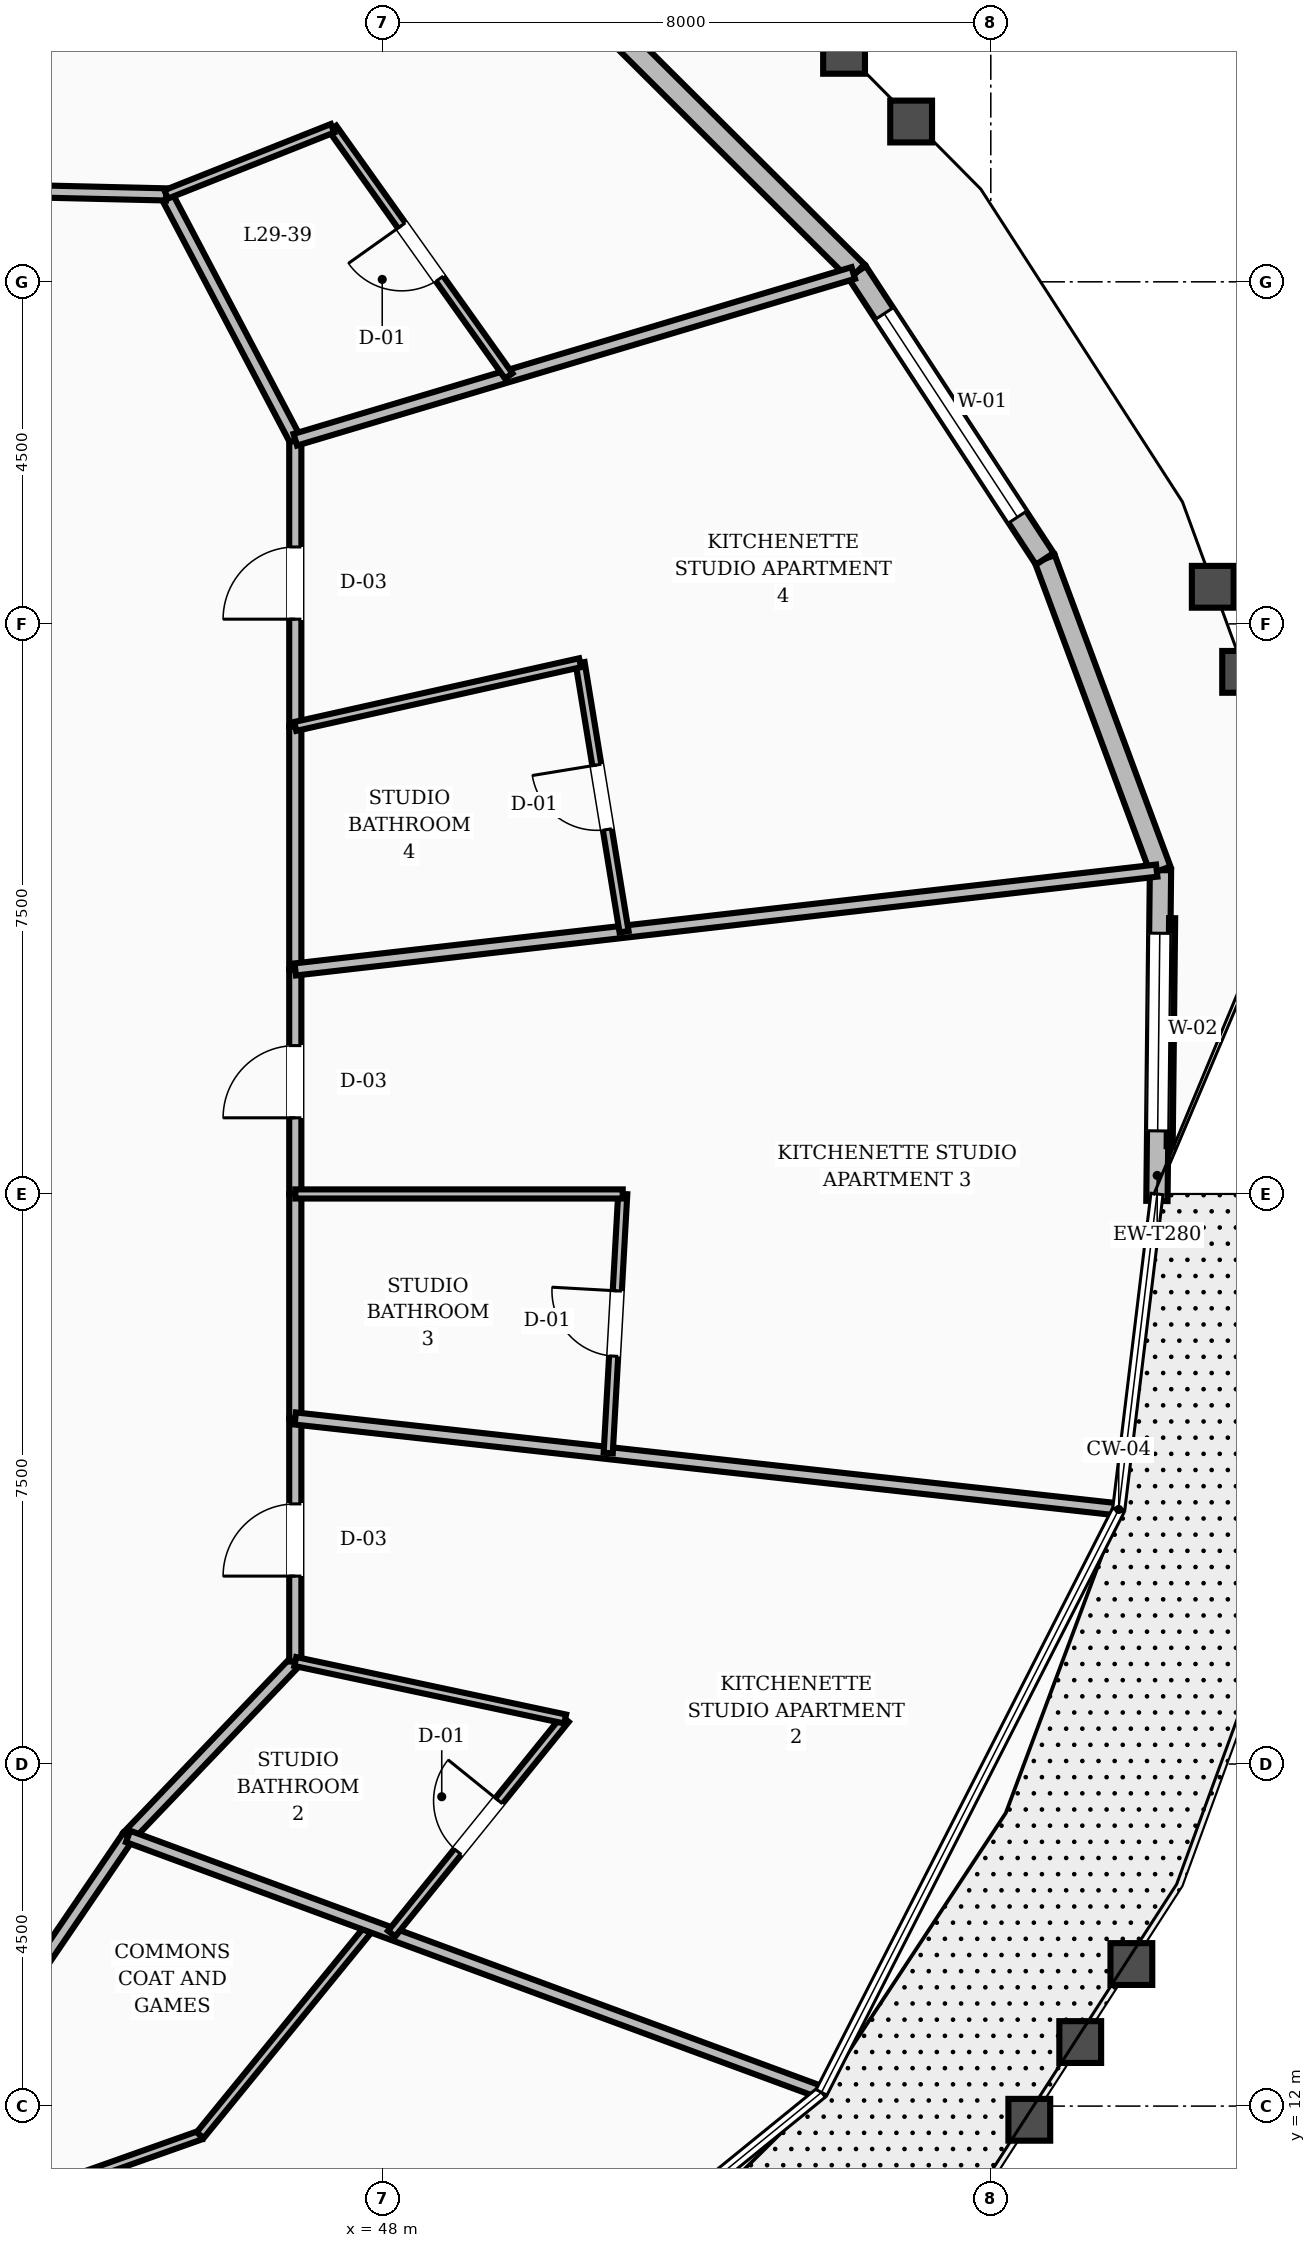
"""IFC4 building model, lengths in metres.
Left out: names, types, materials, properties, quantities, classifications, styles, units other than length and angle.
Written with IfcOpenShell. Run it as: python <this file> out.ifc"""

import sys

from ifc_helpers import new_model, si_unit, direction, frame, frame_2d, origin, place, context, subcontext, project, spatial, rectangle, extrude, element, fill, save


model = new_model("IFC4")
c1 = context("Model", 3, precision=1e-05, world=origin(), true_north=direction((0.0, 1.0)))
c2 = subcontext(c1, "Body", "Model", "MODEL_VIEW")
j1 = project(units=[si_unit("LENGTHUNIT", "METRE"), si_unit("PLANEANGLEUNIT", "RADIAN")], contexts=[c1])
p1 = place(None, origin())
s1 = spatial("IfcSite", under=j1, at=p1, CompositionType="ELEMENT")
p2 = place(p1, origin())
s2 = spatial("IfcBuilding", under=s1, at=p2, CompositionType="ELEMENT")
p3 = place(p2, frame((0.0, 0.0, 117.2)))
s3 = spatial("IfcBuildingStorey", under=s2, at=p3, CompositionType="ELEMENT", Elevation=117.2)
p4 = place(p3, frame((58.186, 23.908, 0.0), z_axis=(0.0, 0.0, 1.0), x_axis=(0.010826854859, 0.999941387889, 0.0)))
e1 = element("IfcWall", 1, at=p4, inside=s3, PredefinedType="STANDARD", context=c2, shape_type="SweptSolid", body=[
    extrude(rectangle(XDim=4.352, YDim=0.28, at=frame_2d((2.176, 0.0))), origin(), (0.0, 0.0, 1.0), 2.82),
])
p5 = place(p4, frame((0.922, 0.0, 0.8)))
e2 = element("IfcOpeningElement", 2, at=p5, cuts=e1, PredefinedType="OPENING", context=c2, shape_type="SweptSolid", body=[
    extrude(rectangle(XDim=2.6, YDim=1.65, at=frame_2d((1.3, 0.825))), frame((0.0, 0.15, 0.0), z_axis=(0.0, -1.0, 0.0), x_axis=(1.0, 0.0, 0.0)), (0.0, 0.0, 1.0), 0.3),
])
p6 = place(p3, frame((58.233, 28.26, 0.0), z_axis=(0.0, 0.0, 1.0), x_axis=(-0.34836047158, 0.937360646625, 0.0)))
e3 = element("IfcWall", 3, at=p6, inside=s3, PredefinedType="STANDARD", context=c2, shape_type="SweptSolid", body=[
    extrude(rectangle(XDim=4.37, YDim=0.28, at=frame_2d((2.185, 0.0))), origin(), (0.0, 0.0, 1.0), 2.82),
])
p7 = place(p3, frame((56.71, 32.356, 0.0), z_axis=(0.0, 0.0, 1.0), x_axis=(-0.547750773174, 0.836641554363, 0.0)))
e4 = element("IfcWall", 4, at=p7, inside=s3, PredefinedType="STANDARD", context=c2, shape_type="SweptSolid", body=[
    extrude(rectangle(XDim=4.512, YDim=0.28, at=frame_2d((2.256, 0.0))), origin(), (0.0, 0.0, 1.0), 2.82),
])
p8 = place(p7, frame((0.656, 0.0, 0.8)))
e5 = element("IfcOpeningElement", 5, at=p8, cuts=e4, PredefinedType="OPENING", context=c2, shape_type="SweptSolid", body=[
    extrude(rectangle(XDim=3.2, YDim=1.65, at=frame_2d((1.6, 0.825))), frame((0.0, 0.15, 0.0), z_axis=(0.0, -1.0, 0.0), x_axis=(1.0, 0.0, 0.0)), (0.0, 0.0, 1.0), 0.3),
])
p9 = place(p3, frame((54.239, 36.131, 0.0), z_axis=(0.0, 0.0, 1.0), x_axis=(-0.708977561681, 0.705231038052, 0.0)))
e6 = element("IfcWall", 6, at=p9, inside=s3, PredefinedType="STANDARD", context=c2, shape_type="SweptSolid", body=[
    extrude(rectangle(XDim=4.692, YDim=0.28, at=frame_2d((2.346, 0.0))), origin(), (0.0, 0.0, 1.0), 2.82),
])
p10 = place(p3, frame((46.85, 24.0, 0.0), z_axis=(0.0, 0.0, 1.0), x_axis=(0.0, 1.0, 0.0)))
e7 = element("IfcWall", 7, at=p10, inside=s3, PredefinedType="SOLIDWALL", context=c2, shape_type="SweptSolid", body=[
    extrude(rectangle(XDim=2.954, YDim=0.16, at=frame_2d((1.477, 0.0))), origin(), (0.0, 0.0, 1.0), 2.8),
])
p11 = place(p10, frame((1.002, 0.0, 0.0)))
e8 = element("IfcOpeningElement", 8, at=p11, cuts=e7, PredefinedType="OPENING", context=c2, shape_type="SweptSolid", body=[
    extrude(rectangle(XDim=0.95, YDim=2.1, at=frame_2d((0.475, 1.05))), frame((0.0, 0.09, 0.0), z_axis=(0.0, -1.0, 0.0), x_axis=(1.0, 0.0, 0.0)), (0.0, 0.0, 1.0), 0.18),
])
p12 = place(p3, frame((46.85, 26.954, 0.0), z_axis=(0.0, 0.0, 1.0), x_axis=(0.0, 1.0, 0.0)))
e9 = element("IfcWall", 9, at=p12, inside=s3, PredefinedType="SOLIDWALL", context=c2, shape_type="SweptSolid", body=[
    extrude(rectangle(XDim=3.197, YDim=0.16, at=frame_2d((1.599, 0.0))), origin(), (0.0, 0.0, 1.0), 2.8),
])
p13 = place(p3, frame((46.85, 30.151, 0.0), z_axis=(0.0, 0.0, 1.0), x_axis=(0.0, 1.0, 0.0)))
e10 = element("IfcWall", 10, at=p13, inside=s3, PredefinedType="SOLIDWALL", context=c2, shape_type="SweptSolid", body=[
    extrude(rectangle(XDim=3.771, YDim=0.16, at=frame_2d((1.886, 0.0))), origin(), (0.0, 0.0, 1.0), 2.8),
])
p14 = place(p13, frame((1.411, 0.0, 0.0)))
e11 = element("IfcOpeningElement", 11, at=p14, cuts=e10, PredefinedType="OPENING", context=c2, shape_type="SweptSolid", body=[
    extrude(rectangle(XDim=0.95, YDim=2.1, at=frame_2d((0.475, 1.05))), frame((0.0, 0.09, 0.0), z_axis=(0.0, -1.0, 0.0), x_axis=(1.0, 0.0, 0.0)), (0.0, 0.0, 1.0), 0.18),
])
p15 = place(p3, frame((46.85, 33.923, 0.0), z_axis=(0.0, 0.0, 1.0), x_axis=(-0.466093963429, 0.884735224378, 0.0)))
e12 = element("IfcWall", 12, at=p15, inside=s3, PredefinedType="SOLIDWALL", context=c2, shape_type="SweptSolid", body=[
    extrude(rectangle(XDim=3.648, YDim=0.16, at=frame_2d((1.824, 0.0))), origin(), (0.0, 0.0, 1.0), 2.8),
])
p16 = place(p3, frame((45.15, 37.15, 0.0), z_axis=(0.0, 0.0, 1.0), x_axis=(-0.999728709658, 0.023291781507, 0.0)))
e13 = element("IfcWall", 13, at=p16, inside=s3, PredefinedType="SOLIDWALL", context=c2, shape_type="SweptSolid", body=[
    extrude(rectangle(XDim=4.298, YDim=0.16, at=frame_2d((2.149, 0.0))), origin(), (0.0, 0.0, 1.0), 2.8),
])
p17 = place(p16, frame((1.674, 0.0, 0.0)))
e14 = element("IfcOpeningElement", 14, at=p17, cuts=e13, PredefinedType="OPENING", context=c2, shape_type="SweptSolid", body=[
    extrude(rectangle(XDim=0.95, YDim=2.1, at=frame_2d((0.475, 1.05))), frame((0.0, 0.09, 0.0), z_axis=(0.0, -1.0, 0.0), x_axis=(1.0, 0.0, 0.0)), (0.0, 0.0, 1.0), 0.18),
])
p18 = place(p3, frame((42.95, 13.05, 0.0), z_axis=(0.0, 0.0, 1.0), x_axis=(0.562674669208, 0.826678423955, 0.0)))
e15 = element("IfcWall", 15, at=p18, inside=s3, PredefinedType="SOLIDWALL", context=c2, shape_type="SweptSolid", body=[
    extrude(rectangle(XDim=3.021, YDim=0.16, at=frame_2d((1.511, 0.0))), origin(), (0.0, 0.0, 1.0), 2.8),
])
p19 = place(p3, frame((44.65, 15.548, 0.0), z_axis=(0.0, 0.0, 1.0), x_axis=(0.691055487108, 0.722801711216, 0.0)))
e16 = element("IfcWall", 16, at=p19, inside=s3, PredefinedType="SOLIDWALL", context=c2, shape_type="SweptSolid", body=[
    extrude(rectangle(XDim=3.184, YDim=0.16, at=frame_2d((1.592, 0.0))), origin(), (0.0, 0.0, 1.0), 2.8),
])
p20 = place(p3, frame((46.85, 17.849, 0.0), z_axis=(0.0, 0.0, 1.0), x_axis=(0.0, 1.0, 0.0)))
e17 = element("IfcWall", 17, at=p20, inside=s3, PredefinedType="SOLIDWALL", context=c2, shape_type="SweptSolid", body=[
    extrude(rectangle(XDim=3.197, YDim=0.16, at=frame_2d((1.599, 0.0))), origin(), (0.0, 0.0, 1.0), 2.8),
])
p21 = place(p20, frame((1.124, 0.0, 0.0)))
e18 = element("IfcOpeningElement", 18, at=p21, cuts=e17, PredefinedType="OPENING", context=c2, shape_type="SweptSolid", body=[
    extrude(rectangle(XDim=0.95, YDim=2.1, at=frame_2d((0.475, 1.05))), frame((0.0, 0.09, 0.0), z_axis=(0.0, -1.0, 0.0), x_axis=(1.0, 0.0, 0.0)), (0.0, 0.0, 1.0), 0.18),
])
p22 = place(p3, frame((46.85, 21.046, 0.0), z_axis=(0.0, 0.0, 1.0), x_axis=(0.0, 1.0, 0.0)))
e19 = element("IfcWall", 19, at=p22, inside=s3, PredefinedType="SOLIDWALL", context=c2, shape_type="SweptSolid", body=[
    extrude(rectangle(XDim=2.954, YDim=0.16, at=frame_2d((1.477, 0.0))), origin(), (0.0, 0.0, 1.0), 2.8),
])
p23 = place(p3, frame((42.065, 10.366, 0.0), z_axis=(0.0, 0.0, 1.0), x_axis=(0.942672477538, 0.333719343299, 0.0)))
e20 = element("IfcWall", 20, at=p23, inside=s3, PredefinedType="PARTITIONING", context=c2, shape_type="SweptSolid", body=[
    extrude(rectangle(XDim=3.749, YDim=0.12, at=frame_2d((1.874, 0.0))), origin(), (0.0, 0.0, 1.0), 2.8),
])
p24 = place(p3, frame((45.598, 11.617, 0.0), z_axis=(0.0, 0.0, 1.0), x_axis=(0.632136503623, 0.774857045388, 0.0)))
e21 = element("IfcWall", 21, at=p24, inside=s3, PredefinedType="PARTITIONING", context=c2, shape_type="SweptSolid", body=[
    extrude(rectangle(XDim=3.551, YDim=0.12, at=frame_2d((1.776, 0.0))), origin(), (0.0, 0.0, 1.0), 2.8),
])
p25 = place(p3, frame((44.65, 15.548, 0.0), z_axis=(0.0, 0.0, 1.0), x_axis=(0.938144779107, -0.34624322872, 0.0)))
e22 = element("IfcWall", 22, at=p25, inside=s3, PredefinedType="SOLIDWALL", context=c2, shape_type="SweptSolid", body=[
    extrude(rectangle(XDim=9.675, YDim=0.16, at=frame_2d((4.837, 0.0))), origin(), (0.0, 0.0, 1.0), 2.8),
])
p26 = place(p3, frame((48.117, 14.268, 0.0), z_axis=(0.0, 0.0, 1.0), x_axis=(0.628695338922, 0.777651702768, 0.0)))
e23 = element("IfcWall", 23, at=p26, inside=s3, PredefinedType="PARTITIONING", context=c2, shape_type="SweptSolid", body=[
    extrude(rectangle(XDim=3.632, YDim=0.12, at=frame_2d((1.816, 0.0))), origin(), (0.0, 0.0, 1.0), 2.8),
])
p27 = place(p26, frame((1.386, 0.0, 0.0)))
e24 = element("IfcOpeningElement", 24, at=p27, cuts=e23, PredefinedType="OPENING", context=c2, shape_type="SweptSolid", body=[
    extrude(rectangle(XDim=0.86, YDim=2.1, at=frame_2d((0.43, 1.05))), frame((0.0, 0.07, 0.0), z_axis=(0.0, -1.0, 0.0), x_axis=(1.0, 0.0, 0.0)), (0.0, 0.0, 1.0), 0.14),
])
p28 = place(p3, frame((46.85, 17.849, 0.0), z_axis=(0.0, 0.0, 1.0), x_axis=(0.978051717374, -0.208362276195, 0.0)))
e25 = element("IfcWall", 25, at=p28, inside=s3, PredefinedType="PARTITIONING", context=c2, shape_type="SweptSolid", body=[
    extrude(rectangle(XDim=3.63, YDim=0.12, at=frame_2d((1.815, 0.0))), origin(), (0.0, 0.0, 1.0), 2.8),
])
p29 = place(p3, frame((46.85, 21.046, 0.0), z_axis=(0.0, 0.0, 1.0), x_axis=(0.993954333891, -0.109794271889, 0.0)))
e26 = element("IfcWall", 26, at=p29, inside=s3, PredefinedType="SOLIDWALL", context=c2, shape_type="SweptSolid", body=[
    extrude(rectangle(XDim=10.849, YDim=0.16, at=frame_2d((5.425, 0.0))), origin(), (0.0, 0.0, 1.0), 2.8),
])
p30 = place(p3, frame((50.967, 20.592, 0.0), z_axis=(0.0, 0.0, 1.0), x_axis=(0.055996807688, 0.998430947802, 0.0)))
e27 = element("IfcWall", 27, at=p30, inside=s3, PredefinedType="PARTITIONING", context=c2, shape_type="SweptSolid", body=[
    extrude(rectangle(XDim=3.414, YDim=0.12, at=frame_2d((1.707, 0.0))), origin(), (0.0, 0.0, 1.0), 2.8),
])
p31 = place(p30, frame((1.277, 0.0, 0.0)))
e28 = element("IfcOpeningElement", 28, at=p31, cuts=e27, PredefinedType="OPENING", context=c2, shape_type="SweptSolid", body=[
    extrude(rectangle(XDim=0.86, YDim=2.1, at=frame_2d((0.43, 1.05))), frame((0.0, 0.07, 0.0), z_axis=(0.0, -1.0, 0.0), x_axis=(1.0, 0.0, 0.0)), (0.0, 0.0, 1.0), 0.14),
])
p32 = place(p3, frame((46.85, 24.0, 0.0), z_axis=(0.0, 0.0, 1.0), x_axis=(1.0, 0.0, 0.0)))
e29 = element("IfcWall", 29, at=p32, inside=s3, PredefinedType="PARTITIONING", context=c2, shape_type="SweptSolid", body=[
    extrude(rectangle(XDim=4.308, YDim=0.12, at=frame_2d((2.154, 0.0))), origin(), (0.0, 0.0, 1.0), 2.8),
])
p33 = place(p3, frame((46.85, 26.954, 0.0), z_axis=(0.0, 0.0, 1.0), x_axis=(0.993484362684, 0.113968509259, 0.0)))
e30 = element("IfcWall", 30, at=p33, inside=s3, PredefinedType="SOLIDWALL", context=c2, shape_type="SweptSolid", body=[
    extrude(rectangle(XDim=11.407, YDim=0.16, at=frame_2d((5.704, 0.0))), origin(), (0.0, 0.0, 1.0), 2.8),
])
p34 = place(p3, frame((51.175, 27.45, 0.0), z_axis=(0.0, 0.0, 1.0), x_axis=(-0.161295662085, 0.98690612998, 0.0)))
e31 = element("IfcWall", 31, at=p34, inside=s3, PredefinedType="PARTITIONING", context=c2, shape_type="SweptSolid", body=[
    extrude(rectangle(XDim=3.586, YDim=0.12, at=frame_2d((1.793, 0.0))), origin(), (0.0, 0.0, 1.0), 2.8),
])
p35 = place(p34, frame((1.363, 0.0, 0.0)))
e32 = element("IfcOpeningElement", 32, at=p35, cuts=e31, PredefinedType="OPENING", context=c2, shape_type="SweptSolid", body=[
    extrude(rectangle(XDim=0.86, YDim=2.1, at=frame_2d((0.43, 1.05))), frame((0.0, 0.07, 0.0), z_axis=(0.0, -1.0, 0.0), x_axis=(1.0, 0.0, 0.0)), (0.0, 0.0, 1.0), 0.14),
])
p36 = place(p3, frame((46.85, 30.151, 0.0), z_axis=(0.0, 0.0, 1.0), x_axis=(0.975909463738, 0.218175889104, 0.0)))
e33 = element("IfcWall", 33, at=p36, inside=s3, PredefinedType="PARTITIONING", context=c2, shape_type="SweptSolid", body=[
    extrude(rectangle(XDim=3.839, YDim=0.12, at=frame_2d((1.92, 0.0))), origin(), (0.0, 0.0, 1.0), 2.8),
])
p37 = place(p3, frame((46.85, 33.923, 0.0), z_axis=(0.0, 0.0, 1.0), x_axis=(0.958127454942, 0.286342068315, 0.0)))
e34 = element("IfcWall", 34, at=p37, inside=s3, PredefinedType="SOLIDWALL", context=c2, shape_type="SweptSolid", body=[
    extrude(rectangle(XDim=7.662, YDim=0.16, at=frame_2d((3.831, 0.0))), origin(), (0.0, 0.0, 1.0), 2.8),
])
p38 = place(p3, frame((49.658, 34.762, 0.0), z_axis=(0.0, 0.0, 1.0), x_axis=(-0.579666154862, 0.814854066019, 0.0)))
e35 = element("IfcWall", 35, at=p38, inside=s3, PredefinedType="PARTITIONING", context=c2, shape_type="SweptSolid", body=[
    extrude(rectangle(XDim=3.999, YDim=0.12, at=frame_2d((1.999, 0.0))), origin(), (0.0, 0.0, 1.0), 2.8),
])
p39 = place(p38, frame((1.569, 0.0, 0.0)))
e36 = element("IfcOpeningElement", 36, at=p39, cuts=e35, PredefinedType="OPENING", context=c2, shape_type="SweptSolid", body=[
    extrude(rectangle(XDim=0.86, YDim=2.1, at=frame_2d((0.43, 1.05))), frame((0.0, 0.07, 0.0), z_axis=(0.0, -1.0, 0.0), x_axis=(1.0, 0.0, 0.0)), (0.0, 0.0, 1.0), 0.14),
])
p40 = place(p3, frame((45.15, 37.15, 0.0), z_axis=(0.0, 0.0, 1.0), x_axis=(0.929331632403, 0.369246146921, 0.0)))
e37 = element("IfcWall", 37, at=p40, inside=s3, PredefinedType="PARTITIONING", context=c2, shape_type="SweptSolid", body=[
    extrude(rectangle(XDim=2.356, YDim=0.12, at=frame_2d((1.178, 0.0))), origin(), (0.0, 0.0, 1.0), 2.8),
])
p41 = place(p3, frame((40.854, 37.25, 0.0), z_axis=(0.0, 0.0, 1.0), x_axis=(0.774531610093, 0.632535204528, 0.0)))
e38 = element("IfcWall", 38, at=p41, inside=s3, PredefinedType="SOLIDWALL", context=c2, shape_type="SweptSolid", body=[
    extrude(rectangle(XDim=7.704, YDim=0.16, at=frame_2d((3.852, 0.0))), origin(), (0.0, 0.0, 1.0), 2.8),
])
p42 = place(p5, origin())
e39 = element("IfcWindow", 39, at=p42, inside=s3, PartitioningType="SINGLE_PANEL", PredefinedType="WINDOW", context=c2, shape_type="SweptSolid", body=[
    extrude(rectangle(XDim=2.6, YDim=1.65, at=frame_2d((1.3, 0.825))), frame((0.0, 0.03, 0.0), z_axis=(0.0, -1.0, 0.0), x_axis=(1.0, 0.0, 0.0)), (0.0, 0.0, 1.0), 0.06),
])
fill(e2, e39)
p43 = place(p8, origin())
e40 = element("IfcWindow", 40, at=p43, inside=s3, PartitioningType="SINGLE_PANEL", PredefinedType="WINDOW", context=c2, shape_type="SweptSolid", body=[
    extrude(rectangle(XDim=3.2, YDim=1.65, at=frame_2d((1.6, 0.825))), frame((0.0, 0.03, 0.0), z_axis=(0.0, -1.0, 0.0), x_axis=(1.0, 0.0, 0.0)), (0.0, 0.0, 1.0), 0.06),
])
fill(e5, e40)
p44 = place(p27, origin())
e41 = element("IfcDoor", 41, at=p44, inside=s3, OperationType="SINGLE_SWING_RIGHT", PredefinedType="DOOR", context=c2, shape_type="SweptSolid", body=[
    extrude(rectangle(XDim=0.86, YDim=2.1, at=frame_2d((0.43, 1.05))), frame((0.0, 0.025, 0.0), z_axis=(0.0, -1.0, 0.0), x_axis=(1.0, 0.0, 0.0)), (0.0, 0.0, 1.0), 0.05),
])
fill(e24, e41)
p45 = place(p21, origin())
e42 = element("IfcDoor", 42, at=p45, inside=s3, OperationType="SINGLE_SWING_LEFT", PredefinedType="DOOR", context=c2, shape_type="SweptSolid", body=[
    extrude(rectangle(XDim=0.95, YDim=2.1, at=frame_2d((0.475, 1.05))), frame((0.0, 0.025, 0.0), z_axis=(0.0, -1.0, 0.0), x_axis=(1.0, 0.0, 0.0)), (0.0, 0.0, 1.0), 0.05),
])
fill(e18, e42)
p46 = place(p31, origin())
e43 = element("IfcDoor", 43, at=p46, inside=s3, OperationType="SINGLE_SWING_RIGHT", PredefinedType="DOOR", context=c2, shape_type="SweptSolid", body=[
    extrude(rectangle(XDim=0.86, YDim=2.1, at=frame_2d((0.43, 1.05))), frame((0.0, 0.025, 0.0), z_axis=(0.0, -1.0, 0.0), x_axis=(1.0, 0.0, 0.0)), (0.0, 0.0, 1.0), 0.05),
])
fill(e28, e43)
p47 = place(p11, origin())
e44 = element("IfcDoor", 44, at=p47, inside=s3, OperationType="SINGLE_SWING_LEFT", PredefinedType="DOOR", context=c2, shape_type="SweptSolid", body=[
    extrude(rectangle(XDim=0.95, YDim=2.1, at=frame_2d((0.475, 1.05))), frame((0.0, 0.025, 0.0), z_axis=(0.0, -1.0, 0.0), x_axis=(1.0, 0.0, 0.0)), (0.0, 0.0, 1.0), 0.05),
])
fill(e8, e44)
p48 = place(p35, origin())
e45 = element("IfcDoor", 45, at=p48, inside=s3, OperationType="SINGLE_SWING_RIGHT", PredefinedType="DOOR", context=c2, shape_type="SweptSolid", body=[
    extrude(rectangle(XDim=0.86, YDim=2.1, at=frame_2d((0.43, 1.05))), frame((0.0, 0.025, 0.0), z_axis=(0.0, -1.0, 0.0), x_axis=(1.0, 0.0, 0.0)), (0.0, 0.0, 1.0), 0.05),
])
fill(e32, e45)
p49 = place(p14, origin())
e46 = element("IfcDoor", 46, at=p49, inside=s3, OperationType="SINGLE_SWING_LEFT", PredefinedType="DOOR", context=c2, shape_type="SweptSolid", body=[
    extrude(rectangle(XDim=0.95, YDim=2.1, at=frame_2d((0.475, 1.05))), frame((0.0, 0.025, 0.0), z_axis=(0.0, -1.0, 0.0), x_axis=(1.0, 0.0, 0.0)), (0.0, 0.0, 1.0), 0.05),
])
fill(e11, e46)
p50 = place(p39, origin())
e47 = element("IfcDoor", 47, at=p50, inside=s3, OperationType="SINGLE_SWING_RIGHT", PredefinedType="DOOR", context=c2, shape_type="SweptSolid", body=[
    extrude(rectangle(XDim=0.86, YDim=2.1, at=frame_2d((0.43, 1.05))), frame((0.0, 0.025, 0.0), z_axis=(0.0, -1.0, 0.0), x_axis=(1.0, 0.0, 0.0)), (0.0, 0.0, 1.0), 0.05),
])
fill(e36, e47)
save(model, sys.argv[1])
